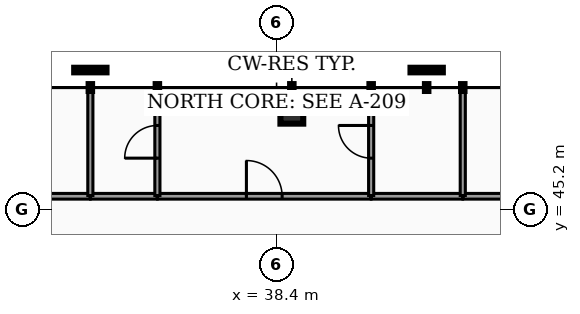
"""IFC4 building model, lengths in metres.
Left out: names, types, materials, properties, quantities, classifications, styles, units other than length and angle.
Written with IfcOpenShell. Run it as: python <this file> out.ifc"""

import sys

from ifc_helpers import new_model, si_unit, direction, frame, frame_2d, origin, origin_2d, place, context, subcontext, project, spatial, rectangle, hollow_rectangle, extrude, element, fill, save


model = new_model("IFC4")
c1 = context("Model", 3, precision=1e-05, world=origin(), true_north=direction((0.0, 1.0)))
c2 = subcontext(c1, "Body", "Model", "MODEL_VIEW")
j1 = project(units=[si_unit("LENGTHUNIT", "METRE"), si_unit("PLANEANGLEUNIT", "RADIAN")], contexts=[c1])
p1 = place(None, origin())
s1 = spatial("IfcSite", under=j1, at=p1, CompositionType="ELEMENT")
p2 = place(p1, origin())
s2 = spatial("IfcBuilding", under=s1, at=p2, CompositionType="ELEMENT")
p3 = place(p2, frame((0.0, 0.0, 215.56)))
s3 = spatial("IfcBuildingStorey", under=s2, at=p3, CompositionType="ELEMENT", Elevation=215.56)
p4 = place(p3, frame((38.802, 47.761, 0.0), z_axis=(-0.006137787086, -0.036673277842, 0.999308460017), x_axis=(0.986282164302, -0.165068144653, 0.0)))
e1 = element("IfcColumn", 1, at=p4, inside=s3, PredefinedType="COLUMN", context=c2, shape_type="SweptSolid", body=[
    extrude(hollow_rectangle(XDim=0.6, YDim=0.6, WallThickness=0.03, at=origin_2d()), origin(), (0.0, 0.0, 1.0), 3.182),
])
p5 = place(p3, frame((28.55, 45.55, 0.0), z_axis=(0.0, 0.0, 1.0), x_axis=(1.0, 0.0, 0.0)))
e2 = element("IfcWall", 2, at=p5, inside=s3, PredefinedType="PARTITIONING", context=c2, shape_type="SweptSolid", body=[
    extrude(rectangle(XDim=4.945, YDim=0.15, at=frame_2d((2.473, 0.0))), origin(), (0.0, 0.0, 1.0), 2.235),
])
p6 = place(p3, frame((43.305, 45.55, 0.0), z_axis=(0.0, 0.0, 1.0), x_axis=(1.0, 0.0, 0.0)))
e3 = element("IfcWall", 3, at=p6, inside=s3, PredefinedType="PARTITIONING", context=c2, shape_type="SweptSolid", body=[
    extrude(rectangle(XDim=5.045, YDim=0.15, at=frame_2d((2.522, 0.0))), origin(), (0.0, 0.0, 1.0), 2.235),
])
p7 = place(p3, frame((35.269, 45.55, 0.0), z_axis=(0.0, 0.0, 1.0), x_axis=(1.0, 0.0, 0.0)))
e4 = element("IfcWall", 4, at=p7, inside=s3, PredefinedType="PARTITIONING", context=c2, shape_type="SweptSolid", body=[
    extrude(rectangle(XDim=5.615, YDim=0.15, at=frame_2d((2.808, 0.0))), origin(), (0.0, 0.0, 1.0), 2.235),
])
p8 = place(p7, frame((2.338, 0.0, 0.0)))
e5 = element("IfcOpeningElement", 5, at=p8, cuts=e4, PredefinedType="OPENING", context=c2, shape_type="SweptSolid", body=[
    extrude(rectangle(XDim=0.94, YDim=2.05, at=frame_2d((0.47, 1.025))), frame((0.0, 0.085, 0.0), z_axis=(0.0, -1.0, 0.0), x_axis=(1.0, 0.0, 0.0)), (0.0, 0.0, 1.0), 0.17),
])
p9 = place(p3, frame((40.894, 45.55, 0.0), z_axis=(0.0, 0.0, 1.0), x_axis=(1.0, 0.0, 0.0)))
e6 = element("IfcWall", 6, at=p9, inside=s3, PredefinedType="PARTITIONING", context=c2, shape_type="SweptSolid", body=[
    extrude(rectangle(XDim=2.401, YDim=0.15, at=frame_2d((1.2, 0.0))), origin(), (0.0, 0.0, 1.0), 2.235),
])
p10 = place(p3, frame((33.505, 45.55, 0.0), z_axis=(0.0, 0.0, 1.0), x_axis=(1.0, 0.0, 0.0)))
e7 = element("IfcWall", 7, at=p10, inside=s3, PredefinedType="PARTITIONING", context=c2, shape_type="SweptSolid", body=[
    extrude(rectangle(XDim=1.754, YDim=0.15, at=frame_2d((0.877, 0.0))), origin(), (0.0, 0.0, 1.0), 2.235),
])
for number, where, z_axis, x_axis in (
    (8, (33.5, 45.57, 0.0), (0.0, 0.0, 1.0), (0.0, 1.0, 0.0)),
    (9, (43.3, 45.57, 0.0), (0.0, 0.0, 1.0), (0.0, 1.0, 0.0)),
):
    element("IfcWall", number, at=place(p3, frame(where, z_axis=z_axis, x_axis=x_axis)), inside=s3, PredefinedType="PARTITIONING", context=c2, shape_type="SweptSolid", body=[
        extrude(rectangle(XDim=2.826, YDim=0.135, at=frame_2d((1.413, 0.0))), origin(), (0.0, 0.0, 1.0), 2.235),
    ])
p11 = place(p3, frame((40.889, 45.57, 0.0), z_axis=(0.0, 0.0, 1.0), x_axis=(0.0, 1.0, 0.0)))
e10 = element("IfcWall", 10, at=p11, inside=s3, PredefinedType="PARTITIONING", context=c2, shape_type="SweptSolid", body=[
    extrude(rectangle(XDim=2.826, YDim=0.135, at=frame_2d((1.413, 0.0))), origin(), (0.0, 0.0, 1.0), 2.235),
])
p12 = place(p11, frame((0.983, 0.0, 0.0)))
e11 = element("IfcOpeningElement", 11, at=p12, cuts=e10, PredefinedType="OPENING", context=c2, shape_type="SweptSolid", body=[
    extrude(rectangle(XDim=0.86, YDim=2.05, at=frame_2d((0.43, 1.025))), frame((0.0, 0.077, 0.0), z_axis=(0.0, -1.0, 0.0), x_axis=(1.0, 0.0, 0.0)), (0.0, 0.0, 1.0), 0.155),
])
p13 = place(p3, frame((35.264, 45.57, 0.0), z_axis=(0.0, 0.0, 1.0), x_axis=(0.0, 1.0, 0.0)))
e12 = element("IfcWall", 12, at=p13, inside=s3, PredefinedType="PARTITIONING", context=c2, shape_type="SweptSolid", body=[
    extrude(rectangle(XDim=2.826, YDim=0.135, at=frame_2d((1.413, 0.0))), origin(), (0.0, 0.0, 1.0), 2.235),
])
p14 = place(p13, frame((0.983, 0.0, 0.0)))
e13 = element("IfcOpeningElement", 13, at=p14, cuts=e12, PredefinedType="OPENING", context=c2, shape_type="SweptSolid", body=[
    extrude(rectangle(XDim=0.86, YDim=2.05, at=frame_2d((0.43, 1.025))), frame((0.0, 0.077, 0.0), z_axis=(0.0, -1.0, 0.0), x_axis=(1.0, 0.0, 0.0)), (0.0, 0.0, 1.0), 0.155),
])
p15 = place(p8, origin())
e14 = element("IfcDoor", 14, at=p15, inside=s3, OperationType="SINGLE_SWING_LEFT", PredefinedType="DOOR", context=c2, shape_type="SweptSolid", body=[
    extrude(rectangle(XDim=0.94, YDim=2.05, at=frame_2d((0.47, 1.025))), frame((0.0, 0.025, 0.0), z_axis=(0.0, -1.0, 0.0), x_axis=(1.0, 0.0, 0.0)), (0.0, 0.0, 1.0), 0.05),
])
fill(e5, e14)
p16 = place(p12, origin())
e15 = element("IfcDoor", 15, at=p16, inside=s3, OperationType="SINGLE_SWING_RIGHT", PredefinedType="DOOR", context=c2, shape_type="SweptSolid", body=[
    extrude(rectangle(XDim=0.86, YDim=2.05, at=frame_2d((0.43, 1.025))), frame((0.0, 0.025, 0.0), z_axis=(0.0, -1.0, 0.0), x_axis=(1.0, 0.0, 0.0)), (0.0, 0.0, 1.0), 0.05),
])
fill(e11, e15)
p17 = place(p14, origin())
e16 = element("IfcDoor", 16, at=p17, inside=s3, OperationType="SINGLE_SWING_LEFT", PredefinedType="DOOR", context=c2, shape_type="SweptSolid", body=[
    extrude(rectangle(XDim=0.86, YDim=2.05, at=frame_2d((0.43, 1.025))), frame((0.0, 0.025, 0.0), z_axis=(0.0, -1.0, 0.0), x_axis=(1.0, 0.0, 0.0)), (0.0, 0.0, 1.0), 0.05),
])
fill(e13, e16)
save(model, sys.argv[1])
